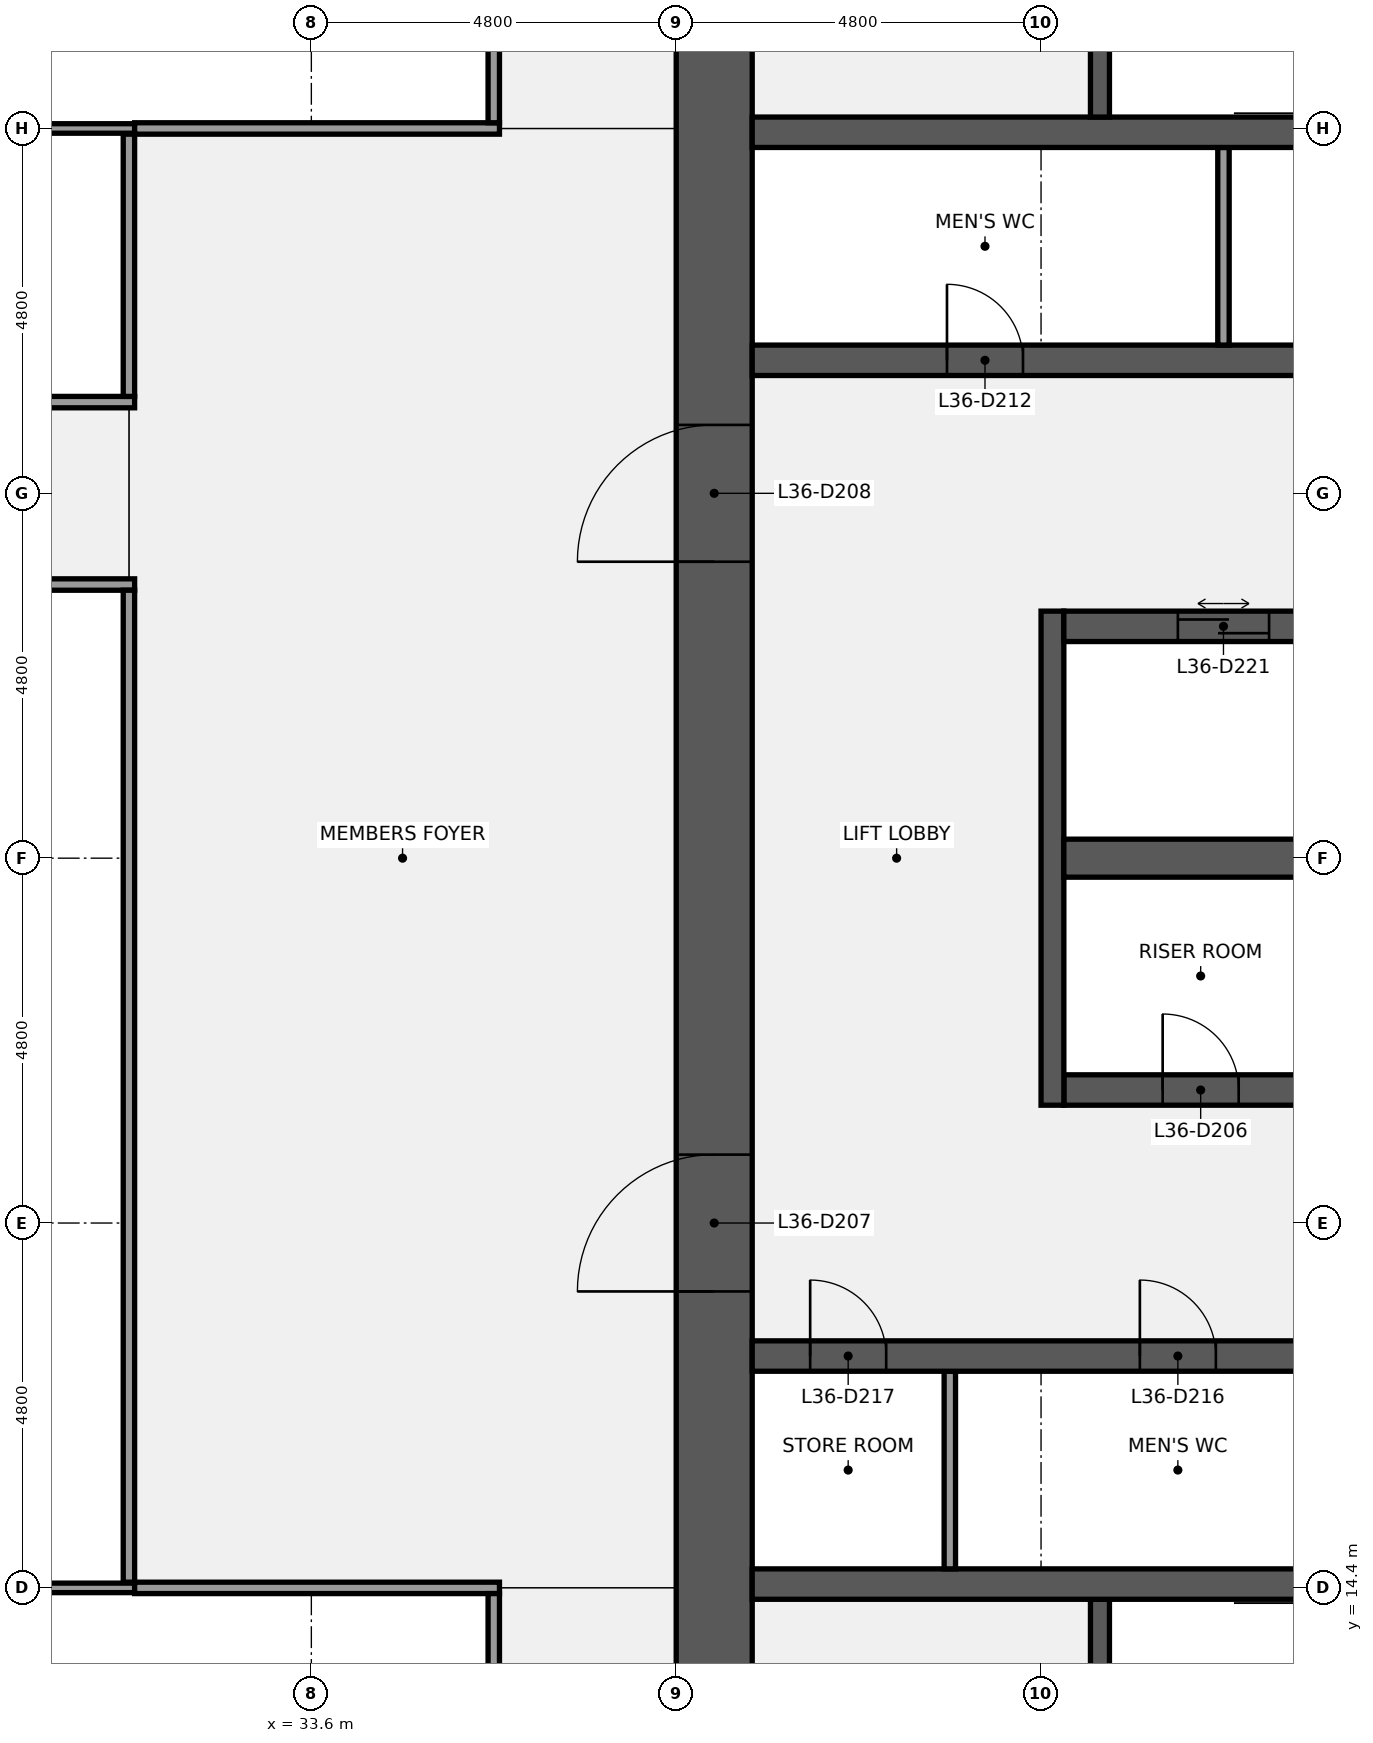
"""IFC4 building model, lengths in metres.
Left out: names, types, materials, properties, quantities, classifications, styles, units other than length and angle.
Written with IfcOpenShell. Run it as: python <this file> out.ifc"""

import sys

from ifc_helpers import new_model, si_unit, direction, frame, frame_2d, origin, place, context, subcontext, project, spatial, rectangle, extrude, element, fill, save


model = new_model("IFC4")
c1 = context("Model", 3, precision=1e-05, world=origin(), true_north=direction((0.0, 1.0)))
c2 = subcontext(c1, "Body", "Model", "MODEL_VIEW")
j1 = project(units=[si_unit("LENGTHUNIT", "METRE"), si_unit("PLANEANGLEUNIT", "RADIAN")], contexts=[c1])
p1 = place(None, origin())
s1 = spatial("IfcSite", under=j1, at=p1, CompositionType="ELEMENT")
p2 = place(p1, origin())
s2 = spatial("IfcBuilding", under=s1, at=p2, CompositionType="ELEMENT")
p3 = place(p2, frame((0.0, 0.0, 164.1)))
s3 = spatial("IfcBuildingStorey", under=s2, at=p3, CompositionType="ELEMENT", Elevation=164.1)
p4 = place(p3, frame((38.9, 9.6, 0.0), z_axis=(0.0, 0.0, 1.0), x_axis=(0.0, 1.0, 0.0)))
e1 = element("IfcWall", 1, at=p4, inside=s3, PredefinedType="SHEAR", context=c2, shape_type="SweptSolid", body=[
    extrude(rectangle(XDim=28.8, YDim=1.0, at=frame_2d((14.4, 0.0))), origin(), (0.0, 0.0, 1.0), 3.84),
])
p5 = place(p4, frame((8.7, 0.0, 0.0)))
e2 = element("IfcOpeningElement", 2, at=p5, cuts=e1, PredefinedType="OPENING", context=c2, shape_type="SweptSolid", body=[
    extrude(rectangle(XDim=1.8, YDim=2.1, at=frame_2d((0.9, 1.05))), frame((0.0, 0.51, 0.0), z_axis=(0.0, -1.0, 0.0), x_axis=(1.0, 0.0, 0.0)), (0.0, 0.0, 1.0), 1.02),
])
p6 = place(p4, frame((18.3, 0.0, 0.0)))
e3 = element("IfcOpeningElement", 3, at=p6, cuts=e1, PredefinedType="OPENING", context=c2, shape_type="SweptSolid", body=[
    extrude(rectangle(XDim=1.8, YDim=2.1, at=frame_2d((0.9, 1.05))), frame((0.0, 0.51, 0.0), z_axis=(0.0, -1.0, 0.0), x_axis=(1.0, 0.0, 0.0)), (0.0, 0.0, 1.0), 1.02),
])
p7 = place(p3, frame((43.975, 10.8, 0.0), z_axis=(0.0, 0.0, 1.0), x_axis=(0.0, 1.0, 0.0)))
e4 = element("IfcWall", 4, at=p7, inside=s3, PredefinedType="SHEAR", context=c2, shape_type="SweptSolid", body=[
    extrude(rectangle(XDim=3.45, YDim=0.25, at=frame_2d((1.725, 0.0))), origin(), (0.0, 0.0, 1.0), 3.84),
])
p8 = place(p7, frame((1.175, 0.0, 0.0)))
e5 = element("IfcOpeningElement", 5, at=p8, cuts=e4, PredefinedType="OPENING", context=c2, shape_type="SweptSolid", body=[
    extrude(rectangle(XDim=1.1, YDim=2.1, at=frame_2d((0.55, 1.05))), frame((0.0, 0.135, 0.0), z_axis=(0.0, -1.0, 0.0), x_axis=(1.0, 0.0, 0.0)), (0.0, 0.0, 1.0), 0.27),
])
p9 = place(p3, frame((39.4, 14.45, 0.0), z_axis=(0.0, 0.0, 1.0), x_axis=(1.0, 0.0, 0.0)))
e6 = element("IfcWall", 6, at=p9, inside=s3, PredefinedType="SHEAR", context=c2, shape_type="SweptSolid", body=[
    extrude(rectangle(XDim=17.2, YDim=0.4, at=frame_2d((8.6, 0.0))), origin(), (0.0, 0.0, 1.0), 3.84),
])
p10 = place(p3, frame((42.0, 14.65, 0.0), z_axis=(0.0, 0.0, 1.0), x_axis=(0.0, 1.0, 0.0)))
e7 = element("IfcWall", 7, at=p10, inside=s3, PredefinedType="PARTITIONING", context=c2, shape_type="SweptSolid", body=[
    extrude(rectangle(XDim=2.6, YDim=0.15, at=frame_2d((1.3, 0.0))), origin(), (0.0, 0.0, 1.0), 3.84),
])
p11 = place(p3, frame((39.4, 17.45, 0.0), z_axis=(0.0, 0.0, 1.0), x_axis=(1.0, 0.0, 0.0)))
e8 = element("IfcWall", 8, at=p11, inside=s3, PredefinedType="SHEAR", context=c2, shape_type="SweptSolid", body=[
    extrude(rectangle(XDim=17.2, YDim=0.4, at=frame_2d((8.6, 0.0))), origin(), (0.0, 0.0, 1.0), 3.84),
])
p12 = place(p11, frame((15.438, 0.0, 0.0)))
e9 = element("IfcOpeningElement", 9, at=p12, cuts=e8, PredefinedType="OPENING", context=c2, shape_type="SweptSolid", body=[
    extrude(rectangle(XDim=1.0, YDim=2.1, at=frame_2d((0.5, 1.05))), frame((0.0, 0.21, 0.0), z_axis=(0.0, -1.0, 0.0), x_axis=(1.0, 0.0, 0.0)), (0.0, 0.0, 1.0), 0.42),
])
p13 = place(p11, frame((12.6, 0.0, 0.0)))
e10 = element("IfcOpeningElement", 10, at=p13, cuts=e8, PredefinedType="OPENING", context=c2, shape_type="SweptSolid", body=[
    extrude(rectangle(XDim=1.0, YDim=2.1, at=frame_2d((0.5, 1.05))), frame((0.0, 0.21, 0.0), z_axis=(0.0, -1.0, 0.0), x_axis=(1.0, 0.0, 0.0)), (0.0, 0.0, 1.0), 0.42),
])
p14 = place(p11, frame((9.6, 0.0, 0.0)))
e11 = element("IfcOpeningElement", 11, at=p14, cuts=e8, PredefinedType="OPENING", context=c2, shape_type="SweptSolid", body=[
    extrude(rectangle(XDim=1.0, YDim=2.1, at=frame_2d((0.5, 1.05))), frame((0.0, 0.21, 0.0), z_axis=(0.0, -1.0, 0.0), x_axis=(1.0, 0.0, 0.0)), (0.0, 0.0, 1.0), 0.42),
])
p15 = place(p11, frame((5.1, 0.0, 0.0)))
e12 = element("IfcOpeningElement", 12, at=p15, cuts=e8, PredefinedType="OPENING", context=c2, shape_type="SweptSolid", body=[
    extrude(rectangle(XDim=1.0, YDim=2.1, at=frame_2d((0.5, 1.05))), frame((0.0, 0.21, 0.0), z_axis=(0.0, -1.0, 0.0), x_axis=(1.0, 0.0, 0.0)), (0.0, 0.0, 1.0), 0.42),
])
p16 = place(p11, frame((0.762, 0.0, 0.0)))
e13 = element("IfcOpeningElement", 13, at=p16, cuts=e8, PredefinedType="OPENING", context=c2, shape_type="SweptSolid", body=[
    extrude(rectangle(XDim=1.0, YDim=2.1, at=frame_2d((0.5, 1.05))), frame((0.0, 0.21, 0.0), z_axis=(0.0, -1.0, 0.0), x_axis=(1.0, 0.0, 0.0)), (0.0, 0.0, 1.0), 0.42),
])
p17 = place(p3, frame((43.5, 20.95, 0.0), z_axis=(0.0, 0.0, 1.0), x_axis=(1.0, 0.0, 0.0)))
e14 = element("IfcWall", 14, at=p17, inside=s3, PredefinedType="SHEAR", context=c2, shape_type="SweptSolid", body=[
    extrude(rectangle(XDim=13.1, YDim=0.4, at=frame_2d((6.55, 0.0))), origin(), (0.0, 0.0, 1.0), 3.84),
])
p18 = place(p17, frame((6.15, 0.0, 0.0)))
e15 = element("IfcOpeningElement", 15, at=p18, cuts=e14, PredefinedType="OPENING", context=c2, shape_type="SweptSolid", body=[
    extrude(rectangle(XDim=1.1, YDim=2.1, at=frame_2d((0.55, 1.05))), frame((0.0, 0.21, 0.0), z_axis=(0.0, -1.0, 0.0), x_axis=(1.0, 0.0, 0.0)), (0.0, 0.0, 1.0), 0.42),
])
p19 = place(p17, frame((1.3, 0.0, 0.0)))
e16 = element("IfcOpeningElement", 16, at=p19, cuts=e14, PredefinedType="OPENING", context=c2, shape_type="SweptSolid", body=[
    extrude(rectangle(XDim=1.0, YDim=2.1, at=frame_2d((0.5, 1.05))), frame((0.0, 0.21, 0.0), z_axis=(0.0, -1.0, 0.0), x_axis=(1.0, 0.0, 0.0)), (0.0, 0.0, 1.0), 0.42),
])
p20 = place(p3, frame((43.35, 20.75, 0.0), z_axis=(0.0, 0.0, 1.0), x_axis=(0.0, 1.0, 0.0)))
e17 = element("IfcWall", 17, at=p20, inside=s3, PredefinedType="SHEAR", context=c2, shape_type="SweptSolid", body=[
    extrude(rectangle(XDim=6.5, YDim=0.3, at=frame_2d((3.25, 0.0))), origin(), (0.0, 0.0, 1.0), 3.84),
])
p21 = place(p3, frame((43.5, 24.0, 0.0), z_axis=(0.0, 0.0, 1.0), x_axis=(1.0, 0.0, 0.0)))
e18 = element("IfcWall", 18, at=p21, inside=s3, PredefinedType="SHEAR", context=c2, shape_type="SweptSolid", body=[
    extrude(rectangle(XDim=13.1, YDim=0.5, at=frame_2d((6.55, 0.0))), origin(), (0.0, 0.0, 1.0), 3.84),
])
p22 = place(p3, frame((43.5, 27.05, 0.0), z_axis=(0.0, 0.0, 1.0), x_axis=(1.0, 0.0, 0.0)))
e19 = element("IfcWall", 19, at=p22, inside=s3, PredefinedType="SHEAR", context=c2, shape_type="SweptSolid", body=[
    extrude(rectangle(XDim=13.1, YDim=0.4, at=frame_2d((6.55, 0.0))), origin(), (0.0, 0.0, 1.0), 3.84),
])
p23 = place(p22, frame((10.7, 0.0, 0.0)))
e20 = element("IfcOpeningElement", 20, at=p23, cuts=e19, PredefinedType="OPENING", context=c2, shape_type="SweptSolid", body=[
    extrude(rectangle(XDim=1.2, YDim=2.1, at=frame_2d((0.6, 1.05))), frame((0.0, 0.21, 0.0), z_axis=(0.0, -1.0, 0.0), x_axis=(1.0, 0.0, 0.0)), (0.0, 0.0, 1.0), 0.42),
])
p24 = place(p22, frame((8.1, 0.0, 0.0)))
e21 = element("IfcOpeningElement", 21, at=p24, cuts=e19, PredefinedType="OPENING", context=c2, shape_type="SweptSolid", body=[
    extrude(rectangle(XDim=1.2, YDim=2.1, at=frame_2d((0.6, 1.05))), frame((0.0, 0.21, 0.0), z_axis=(0.0, -1.0, 0.0), x_axis=(1.0, 0.0, 0.0)), (0.0, 0.0, 1.0), 0.42),
])
p25 = place(p22, frame((5.5, 0.0, 0.0)))
e22 = element("IfcOpeningElement", 22, at=p25, cuts=e19, PredefinedType="OPENING", context=c2, shape_type="SweptSolid", body=[
    extrude(rectangle(XDim=1.2, YDim=2.1, at=frame_2d((0.6, 1.05))), frame((0.0, 0.21, 0.0), z_axis=(0.0, -1.0, 0.0), x_axis=(1.0, 0.0, 0.0)), (0.0, 0.0, 1.0), 0.42),
])
p26 = place(p22, frame((1.5, 0.0, 0.0)))
e23 = element("IfcOpeningElement", 23, at=p26, cuts=e19, PredefinedType="OPENING", context=c2, shape_type="SweptSolid", body=[
    extrude(rectangle(XDim=1.2, YDim=2.1, at=frame_2d((0.6, 1.05))), frame((0.0, 0.21, 0.0), z_axis=(0.0, -1.0, 0.0), x_axis=(1.0, 0.0, 0.0)), (0.0, 0.0, 1.0), 0.42),
])
p27 = place(p3, frame((39.4, 30.55, 0.0), z_axis=(0.0, 0.0, 1.0), x_axis=(1.0, 0.0, 0.0)))
e24 = element("IfcWall", 24, at=p27, inside=s3, PredefinedType="SHEAR", context=c2, shape_type="SweptSolid", body=[
    extrude(rectangle(XDim=17.2, YDim=0.4, at=frame_2d((8.6, 0.0))), origin(), (0.0, 0.0, 1.0), 3.84),
])
p28 = place(p27, frame((15.438, 0.0, 0.0)))
e25 = element("IfcOpeningElement", 25, at=p28, cuts=e24, PredefinedType="OPENING", context=c2, shape_type="SweptSolid", body=[
    extrude(rectangle(XDim=1.0, YDim=2.1, at=frame_2d((0.5, 1.05))), frame((0.0, 0.21, 0.0), z_axis=(0.0, -1.0, 0.0), x_axis=(1.0, 0.0, 0.0)), (0.0, 0.0, 1.0), 0.42),
])
p29 = place(p27, frame((12.0, 0.0, 0.0)))
e26 = element("IfcOpeningElement", 26, at=p29, cuts=e24, PredefinedType="OPENING", context=c2, shape_type="SweptSolid", body=[
    extrude(rectangle(XDim=1.0, YDim=2.1, at=frame_2d((0.5, 1.05))), frame((0.0, 0.21, 0.0), z_axis=(0.0, -1.0, 0.0), x_axis=(1.0, 0.0, 0.0)), (0.0, 0.0, 1.0), 0.42),
])
p30 = place(p27, frame((7.8, 0.0, 0.0)))
e27 = element("IfcOpeningElement", 27, at=p30, cuts=e24, PredefinedType="OPENING", context=c2, shape_type="SweptSolid", body=[
    extrude(rectangle(XDim=1.0, YDim=2.1, at=frame_2d((0.5, 1.05))), frame((0.0, 0.21, 0.0), z_axis=(0.0, -1.0, 0.0), x_axis=(1.0, 0.0, 0.0)), (0.0, 0.0, 1.0), 0.42),
])
p31 = place(p27, frame((2.562, 0.0, 0.0)))
e28 = element("IfcOpeningElement", 28, at=p31, cuts=e24, PredefinedType="OPENING", context=c2, shape_type="SweptSolid", body=[
    extrude(rectangle(XDim=1.0, YDim=2.1, at=frame_2d((0.5, 1.05))), frame((0.0, 0.21, 0.0), z_axis=(0.0, -1.0, 0.0), x_axis=(1.0, 0.0, 0.0)), (0.0, 0.0, 1.0), 0.42),
])
p32 = place(p3, frame((45.6, 30.75, 0.0), z_axis=(0.0, 0.0, 1.0), x_axis=(0.0, 1.0, 0.0)))
e29 = element("IfcWall", 29, at=p32, inside=s3, PredefinedType="PARTITIONING", context=c2, shape_type="SweptSolid", body=[
    extrude(rectangle(XDim=2.6, YDim=0.15, at=frame_2d((1.3, 0.0))), origin(), (0.0, 0.0, 1.0), 3.84),
])
p33 = place(p3, frame((39.4, 33.55, 0.0), z_axis=(0.0, 0.0, 1.0), x_axis=(1.0, 0.0, 0.0)))
e30 = element("IfcWall", 30, at=p33, inside=s3, PredefinedType="SHEAR", context=c2, shape_type="SweptSolid", body=[
    extrude(rectangle(XDim=17.2, YDim=0.4, at=frame_2d((8.6, 0.0))), origin(), (0.0, 0.0, 1.0), 3.84),
])
p34 = place(p3, frame((43.975, 33.75, 0.0), z_axis=(0.0, 0.0, 1.0), x_axis=(0.0, 1.0, 0.0)))
e31 = element("IfcWall", 31, at=p34, inside=s3, PredefinedType="SHEAR", context=c2, shape_type="SweptSolid", body=[
    extrude(rectangle(XDim=3.45, YDim=0.25, at=frame_2d((1.725, 0.0))), origin(), (0.0, 0.0, 1.0), 3.84),
])
p35 = place(p34, frame((1.175, 0.0, 0.0)))
e32 = element("IfcOpeningElement", 32, at=p35, cuts=e31, PredefinedType="OPENING", context=c2, shape_type="SweptSolid", body=[
    extrude(rectangle(XDim=1.1, YDim=2.1, at=frame_2d((0.55, 1.05))), frame((0.0, 0.135, 0.0), z_axis=(0.0, -1.0, 0.0), x_axis=(1.0, 0.0, 0.0)), (0.0, 0.0, 1.0), 0.27),
])
p36 = place(p3, frame((26.475, 14.4, 0.0), z_axis=(0.0, 0.0, 1.0), x_axis=(1.0, 0.0, 0.0)))
e33 = element("IfcWall", 33, at=p36, inside=s3, PredefinedType="PARTITIONING", context=c2, shape_type="SweptSolid", body=[
    extrude(rectangle(XDim=4.8, YDim=0.125, at=frame_2d((2.4, 0.0))), origin(), (0.0, 0.0, 1.0), 2.936),
])
p37 = place(p3, frame((31.275, 14.4, 0.0), z_axis=(0.0, 0.0, 1.0), x_axis=(1.0, 0.0, 0.0)))
e34 = element("IfcWall", 34, at=p37, inside=s3, PredefinedType="PARTITIONING", context=c2, shape_type="SweptSolid", body=[
    extrude(rectangle(XDim=4.8, YDim=0.15, at=frame_2d((2.4, 0.0))), origin(), (0.0, 0.0, 1.0), 2.936),
])
p38 = place(p3, frame((26.325, 27.6, 0.0), z_axis=(0.0, 0.0, 1.0), x_axis=(1.0, 0.0, 0.0)))
e35 = element("IfcWall", 35, at=p38, inside=s3, PredefinedType="PARTITIONING", context=c2, shape_type="SweptSolid", body=[
    extrude(rectangle(XDim=4.95, YDim=0.15, at=frame_2d((2.475, 0.0))), origin(), (0.0, 0.0, 1.0), 2.936),
])
p39 = place(p3, frame((26.325, 30.0, 0.0), z_axis=(0.0, 0.0, 1.0), x_axis=(1.0, 0.0, 0.0)))
e36 = element("IfcWall", 36, at=p39, inside=s3, PredefinedType="PARTITIONING", context=c2, shape_type="SweptSolid", body=[
    extrude(rectangle(XDim=4.95, YDim=0.15, at=frame_2d((2.475, 0.0))), origin(), (0.0, 0.0, 1.0), 2.936),
])
p40 = place(p39, frame((1.975, 0.0, 0.0)))
e37 = element("IfcOpeningElement", 37, at=p40, cuts=e36, PredefinedType="OPENING", context=c2, shape_type="SweptSolid", body=[
    extrude(rectangle(XDim=1.0, YDim=2.1, at=frame_2d((0.5, 1.05))), frame((0.0, 0.085, 0.0), z_axis=(0.0, -1.0, 0.0), x_axis=(1.0, 0.0, 0.0)), (0.0, 0.0, 1.0), 0.17),
])
p41 = place(p3, frame((26.475, 33.6, 0.0), z_axis=(0.0, 0.0, 1.0), x_axis=(1.0, 0.0, 0.0)))
e38 = element("IfcWall", 38, at=p41, inside=s3, PredefinedType="PARTITIONING", context=c2, shape_type="SweptSolid", body=[
    extrude(rectangle(XDim=4.8, YDim=0.125, at=frame_2d((2.4, 0.0))), origin(), (0.0, 0.0, 1.0), 2.936),
])
p42 = place(p3, frame((31.275, 33.6, 0.0), z_axis=(0.0, 0.0, 1.0), x_axis=(1.0, 0.0, 0.0)))
e39 = element("IfcWall", 39, at=p42, inside=s3, PredefinedType="PARTITIONING", context=c2, shape_type="SweptSolid", body=[
    extrude(rectangle(XDim=4.8, YDim=0.15, at=frame_2d((2.4, 0.0))), origin(), (0.0, 0.0, 1.0), 2.936),
])
p43 = place(p3, frame((31.2, 14.475, 0.0), z_axis=(0.0, 0.0, 1.0), x_axis=(0.0, 1.0, 0.0)))
e40 = element("IfcWall", 40, at=p43, inside=s3, PredefinedType="PARTITIONING", context=c2, shape_type="SweptSolid", body=[
    extrude(rectangle(XDim=13.05, YDim=0.15, at=frame_2d((6.525, 0.0))), origin(), (0.0, 0.0, 1.0), 2.936),
])
p44 = place(p3, frame((31.2, 30.075, 0.0), z_axis=(0.0, 0.0, 1.0), x_axis=(0.0, 1.0, 0.0)))
e41 = element("IfcWall", 41, at=p44, inside=s3, PredefinedType="PARTITIONING", context=c2, shape_type="SweptSolid", body=[
    extrude(rectangle(XDim=3.45, YDim=0.15, at=frame_2d((1.725, 0.0))), origin(), (0.0, 0.0, 1.0), 2.936),
])
for number, where, z_axis, x_axis in (
    (42, (36.0, 9.675, 0.0), (0.0, 0.0, 1.0), (0.0, 1.0, 0.0)),
    (43, (36.0, 33.675, 0.0), (0.0, 0.0, 1.0), (0.0, 1.0, 0.0)),
):
    element("IfcWall", number, at=place(p3, frame(where, z_axis=z_axis, x_axis=x_axis)), inside=s3, PredefinedType="PARTITIONING", context=c2, shape_type="SweptSolid", body=[
        extrude(rectangle(XDim=4.65, YDim=0.15, at=frame_2d((2.325, 0.0))), origin(), (0.0, 0.0, 1.0), 2.936),
    ])
p45 = place(p19, origin())
e44 = element("IfcDoor", 44, at=p45, inside=s3, OperationType="SINGLE_SWING_LEFT", PredefinedType="DOOR", context=c2, shape_type="SweptSolid", body=[
    extrude(rectangle(XDim=1.0, YDim=2.1, at=frame_2d((0.5, 1.05))), frame((0.0, 0.025, 0.0), z_axis=(0.0, -1.0, 0.0), x_axis=(1.0, 0.0, 0.0)), (0.0, 0.0, 1.0), 0.05),
])
fill(e16, e44)
p46 = place(p5, origin())
e45 = element("IfcDoor", 45, at=p46, inside=s3, OperationType="DOUBLE_DOOR_SINGLE_SWING", PredefinedType="DOOR", context=c2, shape_type="SweptSolid", body=[
    extrude(rectangle(XDim=1.8, YDim=2.1, at=frame_2d((0.9, 1.05))), frame((0.0, 0.025, 0.0), z_axis=(0.0, -1.0, 0.0), x_axis=(1.0, 0.0, 0.0)), (0.0, 0.0, 1.0), 0.05),
])
fill(e2, e45)
p47 = place(p6, origin())
e46 = element("IfcDoor", 46, at=p47, inside=s3, OperationType="DOUBLE_DOOR_SINGLE_SWING", PredefinedType="DOOR", context=c2, shape_type="SweptSolid", body=[
    extrude(rectangle(XDim=1.8, YDim=2.1, at=frame_2d((0.9, 1.05))), frame((0.0, 0.025, 0.0), z_axis=(0.0, -1.0, 0.0), x_axis=(1.0, 0.0, 0.0)), (0.0, 0.0, 1.0), 0.05),
])
fill(e3, e46)
p48 = place(p31, origin())
e47 = element("IfcDoor", 47, at=p48, inside=s3, OperationType="SINGLE_SWING_LEFT", PredefinedType="DOOR", context=c2, shape_type="SweptSolid", body=[
    extrude(rectangle(XDim=1.0, YDim=2.1, at=frame_2d((0.5, 1.05))), frame((0.0, 0.025, 0.0), z_axis=(0.0, -1.0, 0.0), x_axis=(1.0, 0.0, 0.0)), (0.0, 0.0, 1.0), 0.05),
])
fill(e28, e47)
p49 = place(p15, origin())
e48 = element("IfcDoor", 48, at=p49, inside=s3, OperationType="SINGLE_SWING_LEFT", PredefinedType="DOOR", context=c2, shape_type="SweptSolid", body=[
    extrude(rectangle(XDim=1.0, YDim=2.1, at=frame_2d((0.5, 1.05))), frame((0.0, 0.025, 0.0), z_axis=(0.0, -1.0, 0.0), x_axis=(1.0, 0.0, 0.0)), (0.0, 0.0, 1.0), 0.05),
])
fill(e12, e48)
p50 = place(p16, origin())
e49 = element("IfcDoor", 49, at=p50, inside=s3, OperationType="SINGLE_SWING_LEFT", PredefinedType="DOOR", context=c2, shape_type="SweptSolid", body=[
    extrude(rectangle(XDim=1.0, YDim=2.1, at=frame_2d((0.5, 1.05))), frame((0.0, 0.025, 0.0), z_axis=(0.0, -1.0, 0.0), x_axis=(1.0, 0.0, 0.0)), (0.0, 0.0, 1.0), 0.05),
])
fill(e13, e49)
p51 = place(p26, origin())
e50 = element("IfcDoor", 50, at=p51, inside=s3, OperationType="DOUBLE_DOOR_SLIDING", PredefinedType="DOOR", context=c2, shape_type="SweptSolid", body=[
    extrude(rectangle(XDim=1.2, YDim=2.1, at=frame_2d((0.6, 1.05))), frame((0.0, 0.025, 0.0), z_axis=(0.0, -1.0, 0.0), x_axis=(1.0, 0.0, 0.0)), (0.0, 0.0, 1.0), 0.05),
])
fill(e23, e50)
save(model, sys.argv[1])
